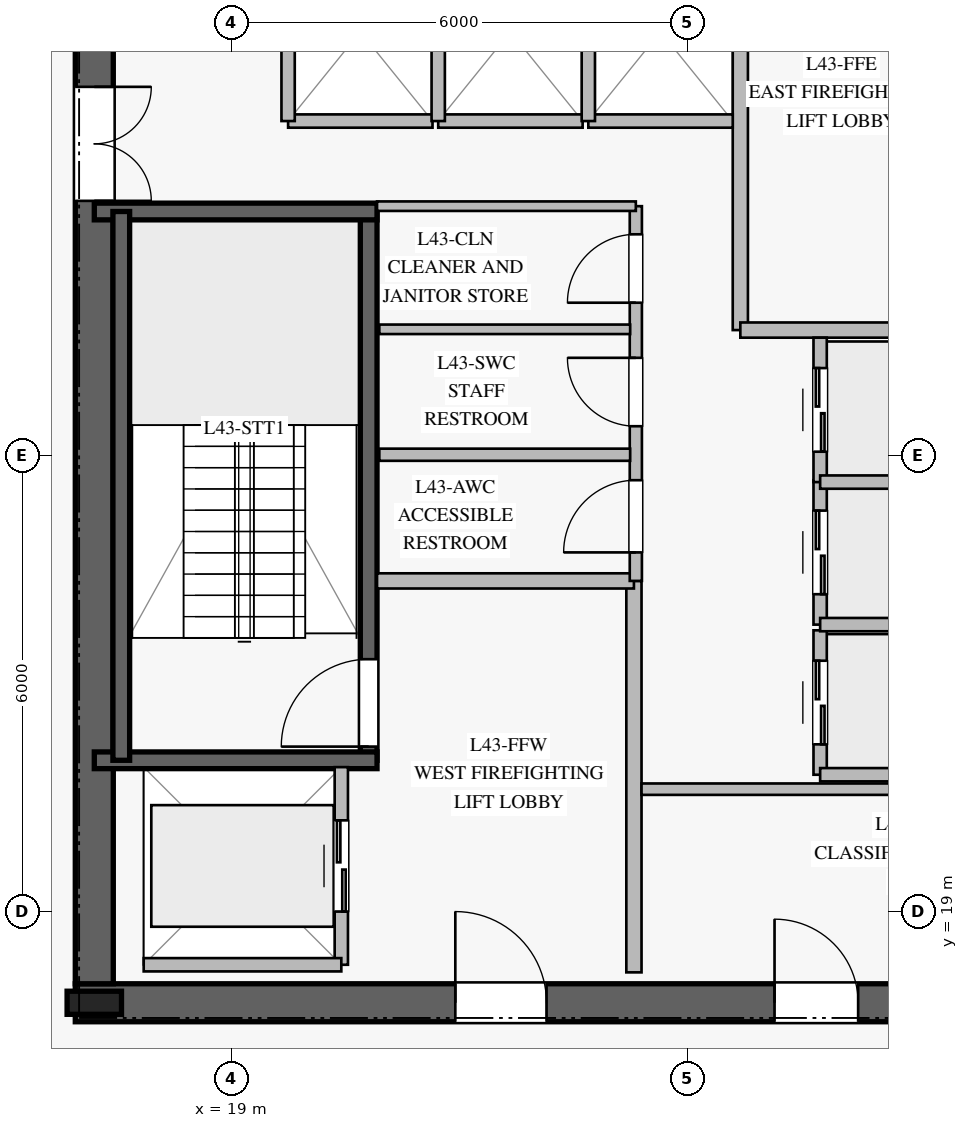
"""IFC4 building model, lengths in metres.
Left out: names, types, materials, properties, quantities, classifications, styles, units other than length and angle.
Written with IfcOpenShell. Run it as: python <this file> out.ifc"""

import sys

from ifc_helpers import new_model, si_unit, direction, frame, frame_2d, origin, origin_2d, place, context, subcontext, project, spatial, rectangle, i_section, extrude, element, fill, save


model = new_model("IFC4")
c1 = context("Model", 3, precision=1e-05, world=origin(), true_north=direction((0.0, 1.0)))
c2 = subcontext(c1, "Body", "Model", "MODEL_VIEW")
j1 = project(units=[si_unit("LENGTHUNIT", "METRE"), si_unit("PLANEANGLEUNIT", "RADIAN")], contexts=[c1])
p1 = place(None, origin())
s1 = spatial("IfcSite", under=j1, at=p1, CompositionType="ELEMENT")
p2 = place(p1, origin())
s2 = spatial("IfcBuilding", under=s1, at=p2, CompositionType="ELEMENT")
p3 = place(p2, frame((0.0, 0.0, 180.8)))
s3 = spatial("IfcBuildingStorey", under=s2, at=p3, CompositionType="ELEMENT", Elevation=180.8)
p4 = place(p3, frame((16.95, 17.8, 0.0), z_axis=(0.0, 0.0, 1.0), x_axis=(1.0, 0.0, 0.0)))
e1 = element("IfcWall", 1, at=p4, inside=s3, PredefinedType="SHEAR", context=c2, shape_type="SweptSolid", body=[
    extrude(rectangle(XDim=16.1, YDim=0.5, at=frame_2d((8.05, 0.0))), origin(), (0.0, 0.0, 1.0), 3.78),
])
p5 = place(p4, frame((5.0, 0.0, 0.0)))
e2 = element("IfcOpeningElement", 2, at=p5, cuts=e1, PredefinedType="OPENING", context=c2, shape_type="SweptSolid", body=[
    extrude(rectangle(XDim=1.2, YDim=2.25, at=frame_2d((0.6, 1.125))), frame((0.0, 0.26, 0.0), z_axis=(0.0, -1.0, 0.0), x_axis=(1.0, 0.0, 0.0)), (0.0, 0.0, 1.0), 0.52),
])
p6 = place(p4, frame((13.95, 0.0, 0.0)))
e3 = element("IfcOpeningElement", 3, at=p6, cuts=e1, PredefinedType="OPENING", context=c2, shape_type="SweptSolid", body=[
    extrude(rectangle(XDim=0.9, YDim=2.1, at=frame_2d((0.45, 1.05))), frame((0.0, 0.26, 0.0), z_axis=(0.0, -1.0, 0.0), x_axis=(1.0, 0.0, 0.0)), (0.0, 0.0, 1.0), 0.52),
])
p7 = place(p4, frame((9.2, 0.0, 0.0)))
e4 = element("IfcOpeningElement", 4, at=p7, cuts=e1, PredefinedType="OPENING", context=c2, shape_type="SweptSolid", body=[
    extrude(rectangle(XDim=1.1, YDim=2.2, at=frame_2d((0.55, 1.1))), frame((0.0, 0.26, 0.0), z_axis=(0.0, -1.0, 0.0), x_axis=(1.0, 0.0, 0.0)), (0.0, 0.0, 1.0), 0.52),
])
p8 = place(p3, frame((17.2, 31.95, 0.0), z_axis=(0.0, 0.0, 1.0), x_axis=(0.0, -1.0, 0.0)))
e5 = element("IfcWall", 5, at=p8, inside=s3, PredefinedType="SHEAR", context=c2, shape_type="SweptSolid", body=[
    extrude(rectangle(XDim=13.9, YDim=0.5, at=frame_2d((6.95, 0.0))), origin(), (0.0, 0.0, 1.0), 3.78),
])
p9 = place(p8, frame((2.1, 0.0, 0.0)))
e6 = element("IfcOpeningElement", 6, at=p9, cuts=e5, PredefinedType="OPENING", context=c2, shape_type="SweptSolid", body=[
    extrude(rectangle(XDim=1.5, YDim=2.2, at=frame_2d((0.75, 1.1))), frame((0.0, 0.26, 0.0), z_axis=(0.0, -1.0, 0.0), x_axis=(1.0, 0.0, 0.0)), (0.0, 0.0, 1.0), 0.52),
])
p10 = place(p3, frame((17.2, 17.8, 0.0), z_axis=(0.0, 0.0, 1.0), x_axis=(1.0, 0.0, 0.0)))
e7 = element("IfcColumn", 7, at=p10, inside=s3, PredefinedType="COLUMN", context=c2, shape_type="SweptSolid", body=[
    extrude(i_section(OverallWidth=0.304, OverallDepth=0.716, WebThickness=0.021, FlangeThickness=0.04, at=origin_2d()), origin(), (0.0, 0.0, 1.0), 4.0),
])
p11 = place(p3, frame((20.81, 20.99, 0.0), z_axis=(0.0, 0.0, 1.0), x_axis=(0.0, 1.0, 0.0)))
e8 = element("IfcWall", 8, at=p11, inside=s3, PredefinedType="SOLIDWALL", context=c2, shape_type="SweptSolid", body=[
    extrude(rectangle(XDim=7.22, YDim=0.22, at=frame_2d((3.61, 0.0))), origin(), (0.0, 0.0, 1.0), 3.78),
])
p12 = place(p11, frame((0.18, 0.0, 0.0)))
e9 = element("IfcOpeningElement", 9, at=p12, cuts=e8, PredefinedType="OPENING", context=c2, shape_type="SweptSolid", body=[
    extrude(rectangle(XDim=1.15, YDim=2.2, at=frame_2d((0.575, 1.1))), frame((0.0, 0.12, 0.0), z_axis=(0.0, -1.0, 0.0), x_axis=(1.0, 0.0, 0.0)), (0.0, 0.0, 1.0), 0.24),
])
for number, where, z_axis, x_axis in (
    (10, (17.2, 20.99, 0.0), (0.0, 0.0, 1.0), (1.0, 0.0, 0.0)),
    (11, (17.2, 28.21, 0.0), (0.0, 0.0, 1.0), (1.0, 0.0, 0.0)),
):
    element("IfcWall", number, at=place(p3, frame(where, z_axis=z_axis, x_axis=x_axis)), inside=s3, PredefinedType="SOLIDWALL", context=c2, shape_type="SweptSolid", body=[
        extrude(rectangle(XDim=3.72, YDim=0.22, at=frame_2d((1.86, 0.0))), origin(), (0.0, 0.0, 1.0), 3.78),
    ])
p13 = place(p3, frame((17.555, 28.21, 0.0), z_axis=(0.0, 0.0, 1.0), x_axis=(0.0, -1.0, 0.0)))
e12 = element("IfcWall", 12, at=p13, inside=s3, PredefinedType="SOLIDWALL", context=c2, shape_type="SweptSolid", body=[
    extrude(rectangle(XDim=7.22, YDim=0.22, at=frame_2d((3.61, 0.0))), origin(), (0.0, 0.0, 1.0), 3.78),
])
p14 = place(p3, frame((24.3, 18.2, 0.0), z_axis=(0.0, 0.0, 1.0), x_axis=(0.0, 1.0, 0.0)))
e13 = element("IfcWall", 13, at=p14, inside=s3, PredefinedType="PARTITIONING", context=c2, shape_type="SweptSolid", body=[
    extrude(rectangle(XDim=5.15, YDim=0.2, at=frame_2d((2.575, 0.0))), origin(), (0.0, 0.0, 1.0), 3.78),
])
p15 = place(p3, frame((20.92, 23.35, 0.0), z_axis=(0.0, 0.0, 1.0), x_axis=(1.0, 0.0, 0.0)))
e14 = element("IfcWall", 14, at=p15, inside=s3, PredefinedType="PARTITIONING", context=c2, shape_type="SweptSolid", body=[
    extrude(rectangle(XDim=3.38, YDim=0.2, at=frame_2d((1.69, 0.0))), origin(), (0.0, 0.0, 1.0), 3.78),
])
p16 = place(p3, frame((25.7, 26.65, 0.0), z_axis=(0.0, 0.0, 1.0), x_axis=(0.0, 1.0, 0.0)))
e15 = element("IfcWall", 15, at=p16, inside=s3, PredefinedType="PARTITIONING", context=c2, shape_type="SweptSolid", body=[
    extrude(rectangle(XDim=5.15, YDim=0.2, at=frame_2d((2.575, 0.0))), origin(), (0.0, 0.0, 1.0), 3.78),
])
p17 = place(p3, frame((25.7, 26.65, 0.0), z_axis=(0.0, 0.0, 1.0), x_axis=(1.0, 0.0, 0.0)))
e16 = element("IfcWall", 16, at=p17, inside=s3, PredefinedType="PARTITIONING", context=c2, shape_type="SweptSolid", body=[
    extrude(rectangle(XDim=3.38, YDim=0.2, at=frame_2d((1.69, 0.0))), origin(), (0.0, 0.0, 1.0), 3.78),
])
p18 = place(p3, frame((24.325, 23.35, 0.0), z_axis=(0.0, 0.0, 1.0), x_axis=(0.0, 1.0, 0.0)))
e17 = element("IfcWall", 17, at=p18, inside=s3, PredefinedType="PLUMBINGWALL", context=c2, shape_type="SweptSolid", body=[
    extrude(rectangle(XDim=4.93, YDim=0.16, at=frame_2d((2.465, 0.0))), origin(), (0.0, 0.0, 1.0), 3.78),
])
p19 = place(p18, frame((0.375, 0.0, 0.0)))
e18 = element("IfcOpeningElement", 18, at=p19, cuts=e17, PredefinedType="OPENING", context=c2, shape_type="SweptSolid", body=[
    extrude(rectangle(XDim=0.95, YDim=2.1, at=frame_2d((0.475, 1.05))), frame((0.0, 0.09, 0.0), z_axis=(0.0, -1.0, 0.0), x_axis=(1.0, 0.0, 0.0)), (0.0, 0.0, 1.0), 0.18),
])
p20 = place(p18, frame((2.035, 0.0, 0.0)))
e19 = element("IfcOpeningElement", 19, at=p20, cuts=e17, PredefinedType="OPENING", context=c2, shape_type="SweptSolid", body=[
    extrude(rectangle(XDim=0.9, YDim=2.1, at=frame_2d((0.45, 1.05))), frame((0.0, 0.09, 0.0), z_axis=(0.0, -1.0, 0.0), x_axis=(1.0, 0.0, 0.0)), (0.0, 0.0, 1.0), 0.18),
])
p21 = place(p18, frame((3.66, 0.0, 0.0)))
e20 = element("IfcOpeningElement", 20, at=p21, cuts=e17, PredefinedType="OPENING", context=c2, shape_type="SweptSolid", body=[
    extrude(rectangle(XDim=0.9, YDim=2.1, at=frame_2d((0.45, 1.05))), frame((0.0, 0.09, 0.0), z_axis=(0.0, -1.0, 0.0), x_axis=(1.0, 0.0, 0.0)), (0.0, 0.0, 1.0), 0.18),
])
p22 = place(p3, frame((20.92, 28.28, 0.0), z_axis=(0.0, 0.0, 1.0), x_axis=(1.0, 0.0, 0.0)))
e21 = element("IfcWall", 21, at=p22, inside=s3, PredefinedType="PARTITIONING", context=c2, shape_type="SweptSolid", body=[
    extrude(rectangle(XDim=3.405, YDim=0.125, at=frame_2d((1.703, 0.0))), origin(), (0.0, 0.0, 1.0), 3.78),
])
p23 = place(p3, frame((20.95, 25.01, 0.0), z_axis=(0.0, 0.0, 1.0), x_axis=(1.0, 0.0, 0.0)))
e22 = element("IfcWall", 22, at=p23, inside=s3, PredefinedType="PLUMBINGWALL", context=c2, shape_type="SweptSolid", body=[
    extrude(rectangle(XDim=3.3, YDim=0.16, at=frame_2d((1.65, 0.0))), origin(), (0.0, 0.0, 1.0), 3.78),
])
p24 = place(p3, frame((20.95, 26.66, 0.0), z_axis=(0.0, 0.0, 1.0), x_axis=(1.0, 0.0, 0.0)))
e23 = element("IfcWall", 23, at=p24, inside=s3, PredefinedType="PARTITIONING", context=c2, shape_type="SweptSolid", body=[
    extrude(rectangle(XDim=3.3, YDim=0.125, at=frame_2d((1.65, 0.0))), origin(), (0.0, 0.0, 1.0), 3.78),
])
p25 = place(p3, frame((24.4, 20.61, 0.0), z_axis=(0.0, 0.0, 1.0), x_axis=(1.0, 0.0, 0.0)))
e24 = element("IfcWall", 24, at=p25, inside=s3, PredefinedType="PARTITIONING", context=c2, shape_type="SweptSolid", body=[
    extrude(rectangle(XDim=5.9, YDim=0.15, at=frame_2d((2.95, 0.0))), origin(), (0.0, 0.0, 1.0), 3.78),
])
p26 = place(p3, frame((19.75, 29.4, 0.0), z_axis=(0.0, 0.0, 1.0), x_axis=(1.0, 0.0, 0.0)))
e25 = element("IfcWall", 25, at=p26, inside=s3, PredefinedType="PARTITIONING", context=c2, shape_type="SweptSolid", body=[
    extrude(rectangle(XDim=1.9, YDim=0.175, at=frame_2d((0.95, 0.0))), origin(), (0.0, 0.0, 1.0), 3.78),
])
p27 = place(p3, frame((19.75, 29.4, 0.0), z_axis=(0.0, 0.0, 1.0), x_axis=(0.0, 1.0, 0.0)))
e26 = element("IfcWall", 26, at=p27, inside=s3, PredefinedType="PARTITIONING", context=c2, shape_type="SweptSolid", body=[
    extrude(rectangle(XDim=2.35, YDim=0.175, at=frame_2d((1.175, 0.0))), origin(), (0.0, 0.0, 1.0), 3.78),
])
p28 = place(p3, frame((21.725, 29.4, 0.0), z_axis=(0.0, 0.0, 1.0), x_axis=(1.0, 0.0, 0.0)))
e27 = element("IfcWall", 27, at=p28, inside=s3, PredefinedType="PARTITIONING", context=c2, shape_type="SweptSolid", body=[
    extrude(rectangle(XDim=1.9, YDim=0.175, at=frame_2d((0.95, 0.0))), origin(), (0.0, 0.0, 1.0), 3.78),
])
p29 = place(p3, frame((21.725, 29.4, 0.0), z_axis=(0.0, 0.0, 1.0), x_axis=(0.0, 1.0, 0.0)))
e28 = element("IfcWall", 28, at=p29, inside=s3, PredefinedType="PARTITIONING", context=c2, shape_type="SweptSolid", body=[
    extrude(rectangle(XDim=2.35, YDim=0.175, at=frame_2d((1.175, 0.0))), origin(), (0.0, 0.0, 1.0), 3.78),
])
p30 = place(p3, frame((23.7, 29.4, 0.0), z_axis=(0.0, 0.0, 1.0), x_axis=(1.0, 0.0, 0.0)))
e29 = element("IfcWall", 29, at=p30, inside=s3, PredefinedType="PARTITIONING", context=c2, shape_type="SweptSolid", body=[
    extrude(rectangle(XDim=1.9, YDim=0.175, at=frame_2d((0.95, 0.0))), origin(), (0.0, 0.0, 1.0), 3.78),
])
p31 = place(p3, frame((23.7, 29.4, 0.0), z_axis=(0.0, 0.0, 1.0), x_axis=(0.0, 1.0, 0.0)))
e30 = element("IfcWall", 30, at=p31, inside=s3, PredefinedType="PARTITIONING", context=c2, shape_type="SweptSolid", body=[
    extrude(rectangle(XDim=2.35, YDim=0.175, at=frame_2d((1.175, 0.0))), origin(), (0.0, 0.0, 1.0), 3.78),
])
p32 = place(p3, frame((26.75, 20.8, 0.0), z_axis=(0.0, 0.0, 1.0), x_axis=(0.0, 1.0, 0.0)))
e31 = element("IfcWall", 31, at=p32, inside=s3, PredefinedType="PARTITIONING", context=c2, shape_type="SweptSolid", body=[
    extrude(rectangle(XDim=1.9, YDim=0.175, at=frame_2d((0.95, 0.0))), origin(), (0.0, 0.0, 1.0), 3.78),
])
p33 = place(p32, frame((0.4, 0.0, 0.0)))
e32 = element("IfcOpeningElement", 32, at=p33, cuts=e31, PredefinedType="OPENING", context=c2, shape_type="SweptSolid", body=[
    extrude(rectangle(XDim=1.1, YDim=2.2, at=frame_2d((0.55, 1.1))), frame((0.0, 0.098, 0.0), z_axis=(0.0, -1.0, 0.0), x_axis=(1.0, 0.0, 0.0)), (0.0, 0.0, 1.0), 0.195),
])
p34 = place(p3, frame((26.75, 20.8, 0.0), z_axis=(0.0, 0.0, 1.0), x_axis=(1.0, 0.0, 0.0)))
e33 = element("IfcWall", 33, at=p34, inside=s3, PredefinedType="PARTITIONING", context=c2, shape_type="SweptSolid", body=[
    extrude(rectangle(XDim=2.35, YDim=0.175, at=frame_2d((1.175, 0.0))), origin(), (0.0, 0.0, 1.0), 3.78),
])
p35 = place(p3, frame((26.75, 22.775, 0.0), z_axis=(0.0, 0.0, 1.0), x_axis=(0.0, 1.0, 0.0)))
e34 = element("IfcWall", 34, at=p35, inside=s3, PredefinedType="PARTITIONING", context=c2, shape_type="SweptSolid", body=[
    extrude(rectangle(XDim=1.9, YDim=0.175, at=frame_2d((0.95, 0.0))), origin(), (0.0, 0.0, 1.0), 3.78),
])
p36 = place(p35, frame((0.4, 0.0, 0.0)))
e35 = element("IfcOpeningElement", 35, at=p36, cuts=e34, PredefinedType="OPENING", context=c2, shape_type="SweptSolid", body=[
    extrude(rectangle(XDim=1.1, YDim=2.2, at=frame_2d((0.55, 1.1))), frame((0.0, 0.098, 0.0), z_axis=(0.0, -1.0, 0.0), x_axis=(1.0, 0.0, 0.0)), (0.0, 0.0, 1.0), 0.195),
])
p37 = place(p3, frame((26.75, 22.775, 0.0), z_axis=(0.0, 0.0, 1.0), x_axis=(1.0, 0.0, 0.0)))
e36 = element("IfcWall", 36, at=p37, inside=s3, PredefinedType="PARTITIONING", context=c2, shape_type="SweptSolid", body=[
    extrude(rectangle(XDim=2.35, YDim=0.175, at=frame_2d((1.175, 0.0))), origin(), (0.0, 0.0, 1.0), 3.78),
])
p38 = place(p3, frame((26.75, 24.65, 0.0), z_axis=(0.0, 0.0, 1.0), x_axis=(0.0, 1.0, 0.0)))
e37 = element("IfcWall", 37, at=p38, inside=s3, PredefinedType="PARTITIONING", context=c2, shape_type="SweptSolid", body=[
    extrude(rectangle(XDim=1.9, YDim=0.175, at=frame_2d((0.95, 0.0))), origin(), (0.0, 0.0, 1.0), 3.78),
])
p39 = place(p38, frame((0.4, 0.0, 0.0)))
e38 = element("IfcOpeningElement", 38, at=p39, cuts=e37, PredefinedType="OPENING", context=c2, shape_type="SweptSolid", body=[
    extrude(rectangle(XDim=1.1, YDim=2.2, at=frame_2d((0.55, 1.1))), frame((0.0, 0.098, 0.0), z_axis=(0.0, -1.0, 0.0), x_axis=(1.0, 0.0, 0.0)), (0.0, 0.0, 1.0), 0.195),
])
p40 = place(p3, frame((26.75, 24.65, 0.0), z_axis=(0.0, 0.0, 1.0), x_axis=(1.0, 0.0, 0.0)))
e39 = element("IfcWall", 39, at=p40, inside=s3, PredefinedType="PARTITIONING", context=c2, shape_type="SweptSolid", body=[
    extrude(rectangle(XDim=2.35, YDim=0.175, at=frame_2d((1.175, 0.0))), origin(), (0.0, 0.0, 1.0), 3.78),
])
p41 = place(p3, frame((20.45, 18.3, 0.0), z_axis=(0.0, 0.0, 1.0), x_axis=(0.0, 1.0, 0.0)))
e40 = element("IfcWall", 40, at=p41, inside=s3, PredefinedType="PARTITIONING", context=c2, shape_type="SweptSolid", body=[
    extrude(rectangle(XDim=2.6, YDim=0.175, at=frame_2d((1.3, 0.0))), origin(), (0.0, 0.0, 1.0), 3.78),
])
p42 = place(p41, frame((0.7, 0.0, 0.0)))
e41 = element("IfcOpeningElement", 41, at=p42, cuts=e40, PredefinedType="OPENING", context=c2, shape_type="SweptSolid", body=[
    extrude(rectangle(XDim=1.2, YDim=2.2, at=frame_2d((0.6, 1.1))), frame((0.0, 0.098, 0.0), z_axis=(0.0, -1.0, 0.0), x_axis=(1.0, 0.0, 0.0)), (0.0, 0.0, 1.0), 0.195),
])
p43 = place(p3, frame((17.85, 18.3, 0.0), z_axis=(0.0, 0.0, 1.0), x_axis=(1.0, 0.0, 0.0)))
e42 = element("IfcWall", 42, at=p43, inside=s3, PredefinedType="PARTITIONING", context=c2, shape_type="SweptSolid", body=[
    extrude(rectangle(XDim=2.6, YDim=0.175, at=frame_2d((1.3, 0.0))), origin(), (0.0, 0.0, 1.0), 3.78),
])
p44 = place(p12, origin())
e43 = element("IfcDoor", 43, at=p44, inside=s3, OperationType="SINGLE_SWING_LEFT", PredefinedType="DOOR", context=c2, shape_type="SweptSolid", body=[
    extrude(rectangle(XDim=1.15, YDim=2.2, at=frame_2d((0.575, 1.1))), frame((0.0, 0.025, 0.0), z_axis=(0.0, -1.0, 0.0), x_axis=(1.0, 0.0, 0.0)), (0.0, 0.0, 1.0), 0.05),
])
fill(e9, e43)
p45 = place(p5, origin())
e44 = element("IfcDoor", 44, at=p45, inside=s3, OperationType="SINGLE_SWING_LEFT", PredefinedType="DOOR", context=c2, shape_type="SweptSolid", body=[
    extrude(rectangle(XDim=1.2, YDim=2.25, at=frame_2d((0.6, 1.125))), frame((0.0, 0.025, 0.0), z_axis=(0.0, -1.0, 0.0), x_axis=(1.0, 0.0, 0.0)), (0.0, 0.0, 1.0), 0.05),
])
fill(e2, e44)
p46 = place(p9, origin())
e45 = element("IfcDoor", 45, at=p46, inside=s3, OperationType="DOUBLE_DOOR_SINGLE_SWING", PredefinedType="DOOR", context=c2, shape_type="SweptSolid", body=[
    extrude(rectangle(XDim=1.5, YDim=2.2, at=frame_2d((0.75, 1.1))), frame((0.0, 0.025, 0.0), z_axis=(0.0, -1.0, 0.0), x_axis=(1.0, 0.0, 0.0)), (0.0, 0.0, 1.0), 0.05),
])
fill(e6, e45)
p47 = place(p19, origin())
e46 = element("IfcDoor", 46, at=p47, inside=s3, OperationType="SINGLE_SWING_LEFT", PredefinedType="DOOR", context=c2, shape_type="SweptSolid", body=[
    extrude(rectangle(XDim=0.95, YDim=2.1, at=frame_2d((0.475, 1.05))), frame((0.0, 0.025, 0.0), z_axis=(0.0, -1.0, 0.0), x_axis=(1.0, 0.0, 0.0)), (0.0, 0.0, 1.0), 0.05),
])
fill(e18, e46)
p48 = place(p20, origin())
e47 = element("IfcDoor", 47, at=p48, inside=s3, OperationType="SINGLE_SWING_RIGHT", PredefinedType="DOOR", context=c2, shape_type="SweptSolid", body=[
    extrude(rectangle(XDim=0.9, YDim=2.1, at=frame_2d((0.45, 1.05))), frame((0.0, 0.025, 0.0), z_axis=(0.0, -1.0, 0.0), x_axis=(1.0, 0.0, 0.0)), (0.0, 0.0, 1.0), 0.05),
])
fill(e19, e47)
p49 = place(p21, origin())
e48 = element("IfcDoor", 48, at=p49, inside=s3, OperationType="SINGLE_SWING_LEFT", PredefinedType="DOOR", context=c2, shape_type="SweptSolid", body=[
    extrude(rectangle(XDim=0.9, YDim=2.1, at=frame_2d((0.45, 1.05))), frame((0.0, 0.025, 0.0), z_axis=(0.0, -1.0, 0.0), x_axis=(1.0, 0.0, 0.0)), (0.0, 0.0, 1.0), 0.05),
])
fill(e20, e48)
p50 = place(p7, origin())
e49 = element("IfcDoor", 49, at=p50, inside=s3, OperationType="SINGLE_SWING_LEFT", PredefinedType="DOOR", context=c2, shape_type="SweptSolid", body=[
    extrude(rectangle(XDim=1.1, YDim=2.2, at=frame_2d((0.55, 1.1))), frame((0.0, 0.025, 0.0), z_axis=(0.0, -1.0, 0.0), x_axis=(1.0, 0.0, 0.0)), (0.0, 0.0, 1.0), 0.05),
])
fill(e4, e49)
p51 = place(p33, origin())
e50 = element("IfcDoor", 50, at=p51, inside=s3, OperationType="DOUBLE_DOOR_SLIDING", PredefinedType="DOOR", context=c2, shape_type="SweptSolid", body=[
    extrude(rectangle(XDim=1.1, YDim=2.2, at=frame_2d((0.55, 1.1))), frame((0.0, 0.025, 0.0), z_axis=(0.0, -1.0, 0.0), x_axis=(1.0, 0.0, 0.0)), (0.0, 0.0, 1.0), 0.05),
])
fill(e32, e50)
p52 = place(p36, origin())
e51 = element("IfcDoor", 51, at=p52, inside=s3, OperationType="DOUBLE_DOOR_SLIDING", PredefinedType="DOOR", context=c2, shape_type="SweptSolid", body=[
    extrude(rectangle(XDim=1.1, YDim=2.2, at=frame_2d((0.55, 1.1))), frame((0.0, 0.025, 0.0), z_axis=(0.0, -1.0, 0.0), x_axis=(1.0, 0.0, 0.0)), (0.0, 0.0, 1.0), 0.05),
])
fill(e35, e51)
p53 = place(p39, origin())
e52 = element("IfcDoor", 52, at=p53, inside=s3, OperationType="DOUBLE_DOOR_SLIDING", PredefinedType="DOOR", context=c2, shape_type="SweptSolid", body=[
    extrude(rectangle(XDim=1.1, YDim=2.2, at=frame_2d((0.55, 1.1))), frame((0.0, 0.025, 0.0), z_axis=(0.0, -1.0, 0.0), x_axis=(1.0, 0.0, 0.0)), (0.0, 0.0, 1.0), 0.05),
])
fill(e38, e52)
p54 = place(p42, origin())
e53 = element("IfcDoor", 53, at=p54, inside=s3, OperationType="DOUBLE_DOOR_SLIDING", PredefinedType="DOOR", context=c2, shape_type="SweptSolid", body=[
    extrude(rectangle(XDim=1.2, YDim=2.2, at=frame_2d((0.6, 1.1))), frame((0.0, 0.025, 0.0), z_axis=(0.0, -1.0, 0.0), x_axis=(1.0, 0.0, 0.0)), (0.0, 0.0, 1.0), 0.05),
])
fill(e41, e53)
save(model, sys.argv[1])
